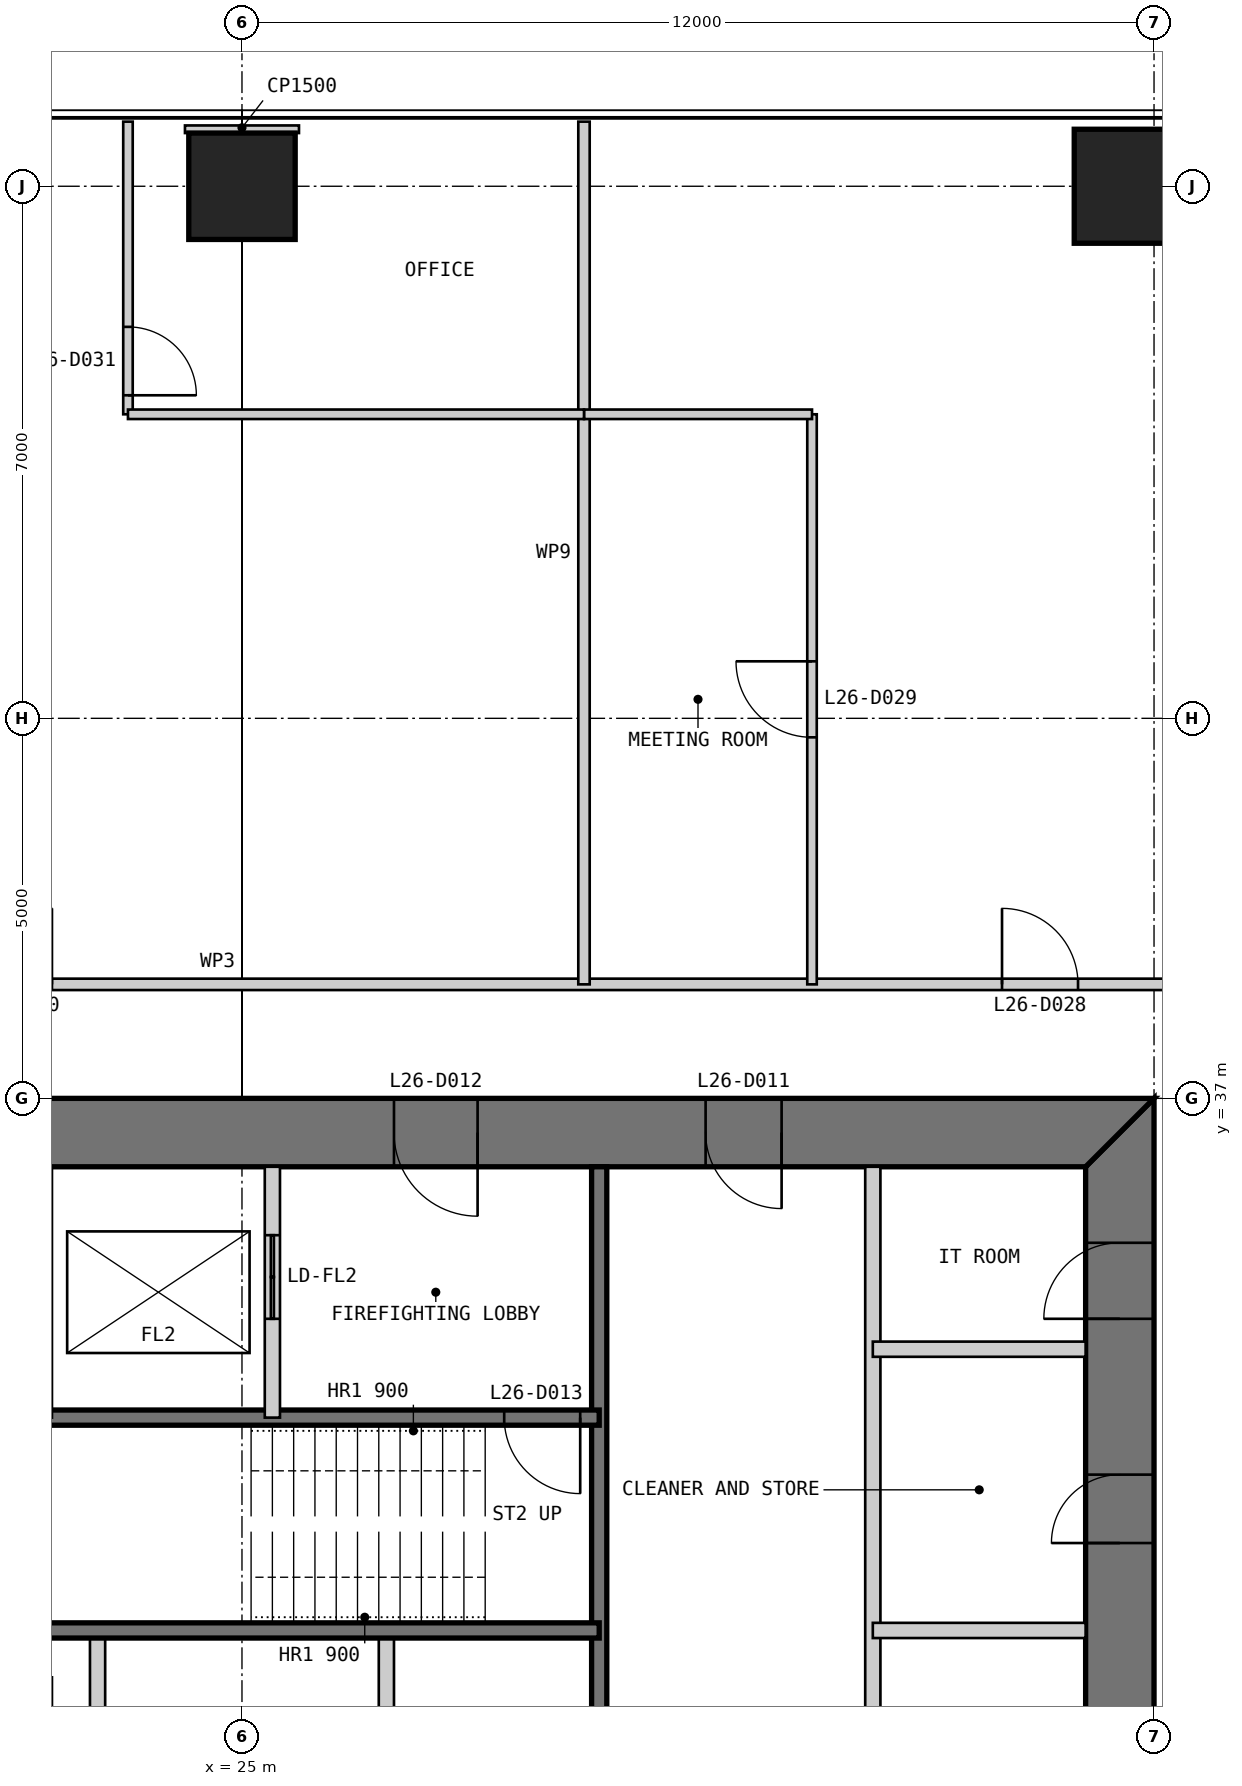
"""IFC4 building model, lengths in metres.
Left out: names, types, materials, properties, quantities, classifications, styles, units other than length and angle.
Written with IfcOpenShell. Run it as: python <this file> out.ifc"""

import sys

from ifc_helpers import new_model, si_unit, direction, frame, frame_2d, origin, origin_2d, place, context, subcontext, project, spatial, polyline, rectangle, outline, extrude, element, fill, save


model = new_model("IFC4")
c1 = context("Model", 3, precision=1e-05, world=origin(), true_north=direction((0.0, 1.0)))
c2 = subcontext(c1, "Body", "Model", "MODEL_VIEW")
j1 = project(units=[si_unit("LENGTHUNIT", "METRE"), si_unit("PLANEANGLEUNIT", "RADIAN")], contexts=[c1])
p1 = place(None, origin())
s1 = spatial("IfcSite", under=j1, at=p1, CompositionType="ELEMENT")
p2 = place(p1, origin())
s2 = spatial("IfcBuilding", under=s1, at=p2, CompositionType="ELEMENT")
p3 = place(p2, frame((0.0, 0.0, 114.4)))
s3 = spatial("IfcBuildingStorey", under=s2, at=p3, CompositionType="ELEMENT", Elevation=114.4)
p4 = place(p3, frame((37.0, 49.0, 0.0), z_axis=(0.0, 0.0, 1.0), x_axis=(1.0, 0.0, 0.0)))
e1 = element("IfcColumn", 1, at=p4, inside=s3, PredefinedType="COLUMN", context=c2, shape_type="SweptSolid", body=[
    extrude(rectangle(XDim=2.1, YDim=1.5, at=origin_2d()), origin(), (0.0, 0.0, 1.0), 4.0),
])
p5 = place(p3, frame((25.0, 49.0, 0.0), z_axis=(0.0, 0.0, 1.0), x_axis=(1.0, 0.0, 0.0)))
e2 = element("IfcColumn", 2, at=p5, inside=s3, PredefinedType="COLUMN", context=c2, shape_type="SweptSolid", body=[
    extrude(rectangle(XDim=1.4, YDim=1.4, at=origin_2d()), origin(), (0.0, 0.0, 1.0), 4.0),
])
p6 = place(p3, frame((36.55, 13.9, 0.0), z_axis=(0.0, 0.0, 1.0), x_axis=(0.0, 1.0, 0.0)))
e3 = element("IfcWall", 3, at=p6, inside=s3, PredefinedType="SHEAR", context=c2, shape_type="SweptSolid", body=[
    extrude(outline(polyline([(-0.9, -0.45), (23.1, -0.45), (22.2, 0.45), (0.0, 0.45), (-0.9, -0.45)])), origin(), (0.0, 0.0, 1.0), 4.0),
])
p7 = place(p6, frame((20.2, 0.0, 0.0)))
e4 = element("IfcOpeningElement", 4, at=p7, cuts=e3, PredefinedType="OPENING", context=c2, shape_type="SweptSolid", body=[
    extrude(rectangle(XDim=1.0, YDim=2.2, at=frame_2d((0.5, 1.1))), frame((0.0, 0.46, 0.0), z_axis=(0.0, -1.0, 0.0), x_axis=(1.0, 0.0, 0.0)), (0.0, 0.0, 1.0), 0.92),
])
p8 = place(p6, frame((17.25, 0.0, 0.0)))
e5 = element("IfcOpeningElement", 5, at=p8, cuts=e3, PredefinedType="OPENING", context=c2, shape_type="SweptSolid", body=[
    extrude(rectangle(XDim=0.9, YDim=2.2, at=frame_2d((0.45, 1.1))), frame((0.0, 0.46, 0.0), z_axis=(0.0, -1.0, 0.0), x_axis=(1.0, 0.0, 0.0)), (0.0, 0.0, 1.0), 0.92),
])
p9 = place(p3, frame((37.0, 36.55, 0.0), z_axis=(0.0, 0.0, 1.0), x_axis=(-1.0, 0.0, 0.0)))
e6 = element("IfcWall", 6, at=p9, inside=s3, PredefinedType="SHEAR", context=c2, shape_type="SweptSolid", body=[
    extrude(outline(polyline([(0.0, -0.45), (24.0, -0.45), (23.1, 0.45), (0.9, 0.45), (0.0, -0.45)])), origin(), (0.0, 0.0, 1.0), 4.0),
])
p10 = place(p9, frame((4.9, 0.0, 0.0)))
e7 = element("IfcOpeningElement", 7, at=p10, cuts=e6, PredefinedType="OPENING", context=c2, shape_type="SweptSolid", body=[
    extrude(rectangle(XDim=1.0, YDim=2.2, at=frame_2d((0.5, 1.1))), frame((0.0, 0.46, 0.0), z_axis=(0.0, -1.0, 0.0), x_axis=(1.0, 0.0, 0.0)), (0.0, 0.0, 1.0), 0.92),
])
p11 = place(p9, frame((8.9, 0.0, 0.0)))
e8 = element("IfcOpeningElement", 8, at=p11, cuts=e6, PredefinedType="OPENING", context=c2, shape_type="SweptSolid", body=[
    extrude(rectangle(XDim=1.1, YDim=2.2, at=frame_2d((0.55, 1.1))), frame((0.0, 0.46, 0.0), z_axis=(0.0, -1.0, 0.0), x_axis=(1.0, 0.0, 0.0)), (0.0, 0.0, 1.0), 0.92),
])
p12 = place(p9, frame((15.05, 0.0, 0.0)))
e9 = element("IfcOpeningElement", 9, at=p12, cuts=e6, PredefinedType="OPENING", context=c2, shape_type="SweptSolid", body=[
    extrude(rectangle(XDim=0.9, YDim=2.2, at=frame_2d((0.45, 1.1))), frame((0.0, 0.46, 0.0), z_axis=(0.0, -1.0, 0.0), x_axis=(1.0, 0.0, 0.0)), (0.0, 0.0, 1.0), 0.92),
])
p13 = place(p9, frame((17.9, 0.0, 0.0)))
e10 = element("IfcOpeningElement", 10, at=p13, cuts=e6, PredefinedType="OPENING", context=c2, shape_type="SweptSolid", body=[
    extrude(rectangle(XDim=1.0, YDim=2.2, at=frame_2d((0.5, 1.1))), frame((0.0, 0.46, 0.0), z_axis=(0.0, -1.0, 0.0), x_axis=(1.0, 0.0, 0.0)), (0.0, 0.0, 1.0), 0.92),
])
p14 = place(p9, frame((21.4, 0.0, 0.0)))
e11 = element("IfcOpeningElement", 11, at=p14, cuts=e6, PredefinedType="OPENING", context=c2, shape_type="SweptSolid", body=[
    extrude(rectangle(XDim=1.0, YDim=2.2, at=frame_2d((0.5, 1.1))), frame((0.0, 0.46, 0.0), z_axis=(0.0, -1.0, 0.0), x_axis=(1.0, 0.0, 0.0)), (0.0, 0.0, 1.0), 0.92),
])
p15 = place(p3, frame((23.1, 20.0, 0.0), z_axis=(0.0, 0.0, 1.0), x_axis=(0.0, 1.0, 0.0)))
e12 = element("IfcWall", 12, at=p15, inside=s3, PredefinedType="PARTITIONING", context=c2, shape_type="SweptSolid", body=[
    extrude(rectangle(XDim=10.0, YDim=0.2, at=frame_2d((5.0, 0.0))), origin(), (0.0, 0.0, 1.0), 3.8),
])
p16 = place(p3, frame((33.3, 36.1, 0.0), z_axis=(0.0, 0.0, 1.0), x_axis=(0.0, -1.0, 0.0)))
e13 = element("IfcWall", 13, at=p16, inside=s3, PredefinedType="PARTITIONING", context=c2, shape_type="SweptSolid", body=[
    extrude(rectangle(XDim=16.1, YDim=0.2, at=frame_2d((8.05, 0.0))), origin(), (0.0, 0.0, 1.0), 3.8),
])
p17 = place(p3, frame((29.7, 36.1, 0.0), z_axis=(0.0, 0.0, 1.0), x_axis=(0.0, -1.0, 0.0)))
e14 = element("IfcWall", 14, at=p17, inside=s3, PredefinedType="SOLIDWALL", context=c2, shape_type="SweptSolid", body=[
    extrude(rectangle(XDim=16.1, YDim=0.2, at=frame_2d((8.05, 0.0))), origin(), (0.0, 0.0, 1.0), 3.8),
])
p18 = place(p3, frame((36.1, 30.0, 0.0), z_axis=(0.0, 0.0, 1.0), x_axis=(-1.0, 0.0, 0.0)))
e15 = element("IfcWall", 15, at=p18, inside=s3, PredefinedType="PARTITIONING", context=c2, shape_type="SweptSolid", body=[
    extrude(rectangle(XDim=2.8, YDim=0.2, at=frame_2d((1.4, 0.0))), origin(), (0.0, 0.0, 1.0), 3.8),
])
p19 = place(p3, frame((26.9, 30.0, 0.0), z_axis=(0.0, 0.0, 1.0), x_axis=(0.0, -1.0, 0.0)))
e16 = element("IfcWall", 16, at=p19, inside=s3, PredefinedType="PARTITIONING", context=c2, shape_type="SweptSolid", body=[
    extrude(rectangle(XDim=10.0, YDim=0.2, at=frame_2d((5.0, 0.0))), origin(), (0.0, 0.0, 1.0), 3.8),
])
p20 = place(p3, frame((29.7, 32.8, 0.0), z_axis=(0.0, 0.0, 1.0), x_axis=(-1.0, 0.0, 0.0)))
e17 = element("IfcWall", 17, at=p20, inside=s3, PredefinedType="SOLIDWALL", context=c2, shape_type="SweptSolid", body=[
    extrude(rectangle(XDim=9.4, YDim=0.2, at=frame_2d((4.7, 0.0))), origin(), (0.0, 0.0, 1.0), 3.8),
])
p21 = place(p20, frame((0.25, 0.0, 0.0)))
e18 = element("IfcOpeningElement", 18, at=p21, cuts=e17, PredefinedType="OPENING", context=c2, shape_type="SweptSolid", body=[
    extrude(rectangle(XDim=1.0, YDim=2.2, at=frame_2d((0.5, 1.1))), frame((0.0, 0.11, 0.0), z_axis=(0.0, -1.0, 0.0), x_axis=(1.0, 0.0, 0.0)), (0.0, 0.0, 1.0), 0.22),
])
p22 = place(p3, frame((29.7, 30.0, 0.0), z_axis=(0.0, 0.0, 1.0), x_axis=(-1.0, 0.0, 0.0)))
e19 = element("IfcWall", 19, at=p22, inside=s3, PredefinedType="SOLIDWALL", context=c2, shape_type="SweptSolid", body=[
    extrude(rectangle(XDim=15.8, YDim=0.2, at=frame_2d((7.9, 0.0))), origin(), (0.0, 0.0, 1.0), 3.8),
])
p23 = place(p3, frame((25.4, 36.1, 0.0), z_axis=(0.0, 0.0, 1.0), x_axis=(0.0, -1.0, 0.0)))
e20 = element("IfcWall", 20, at=p23, inside=s3, PredefinedType="PARTITIONING", context=c2, shape_type="SweptSolid", body=[
    extrude(rectangle(XDim=3.3, YDim=0.2, at=frame_2d((1.65, 0.0))), origin(), (0.0, 0.0, 1.0), 3.8),
])
p24 = place(p23, frame((0.9, 0.0, 0.0)))
e21 = element("IfcOpeningElement", 21, at=p24, cuts=e20, PredefinedType="OPENING", context=c2, shape_type="SweptSolid", body=[
    extrude(rectangle(XDim=1.1, YDim=2.2, at=frame_2d((0.55, 1.1))), frame((0.0, 0.11, 0.0), z_axis=(0.0, -1.0, 0.0), x_axis=(1.0, 0.0, 0.0)), (0.0, 0.0, 1.0), 0.22),
])
p25 = place(p3, frame((36.1, 33.7, 0.0), z_axis=(0.0, 0.0, 1.0), x_axis=(-1.0, 0.0, 0.0)))
e22 = element("IfcWall", 22, at=p25, inside=s3, PredefinedType="PARTITIONING", context=c2, shape_type="SweptSolid", body=[
    extrude(rectangle(XDim=2.8, YDim=0.2, at=frame_2d((1.4, 0.0))), origin(), (0.0, 0.0, 1.0), 3.8),
])
p26 = place(p3, frame((38.5, 38.5, 0.0), z_axis=(0.0, 0.0, 1.0), x_axis=(-1.0, 0.0, 0.0)))
e23 = element("IfcWall", 23, at=p26, inside=s3, PredefinedType="PARTITIONING", context=c2, shape_type="SweptSolid", body=[
    extrude(rectangle(XDim=27.0, YDim=0.15, at=frame_2d((13.5, 0.0))), origin(), (0.0, 0.0, 1.0), 3.85),
])
p27 = place(p26, frame((2.5, 0.0, 0.0)))
e24 = element("IfcOpeningElement", 24, at=p27, cuts=e23, PredefinedType="OPENING", context=c2, shape_type="SweptSolid", body=[
    extrude(rectangle(XDim=1.0, YDim=2.2, at=frame_2d((0.5, 1.1))), frame((0.0, 0.085, 0.0), z_axis=(0.0, -1.0, 0.0), x_axis=(1.0, 0.0, 0.0)), (0.0, 0.0, 1.0), 0.17),
])
p28 = place(p26, frame((16.0, 0.0, 0.0)))
e25 = element("IfcOpeningElement", 25, at=p28, cuts=e23, PredefinedType="OPENING", context=c2, shape_type="SweptSolid", body=[
    extrude(rectangle(XDim=1.0, YDim=2.2, at=frame_2d((0.5, 1.1))), frame((0.0, 0.085, 0.0), z_axis=(0.0, -1.0, 0.0), x_axis=(1.0, 0.0, 0.0)), (0.0, 0.0, 1.0), 0.17),
])
p29 = place(p3, frame((32.5, 46.0, 0.0), z_axis=(0.0, 0.0, 1.0), x_axis=(0.0, -1.0, 0.0)))
e26 = element("IfcWall", 26, at=p29, inside=s3, PredefinedType="PARTITIONING", context=c2, shape_type="SweptSolid", body=[
    extrude(rectangle(XDim=7.5, YDim=0.125, at=frame_2d((3.75, 0.0))), origin(), (0.0, 0.0, 1.0), 3.85),
])
p30 = place(p29, frame((3.25, 0.0, 0.0)))
e27 = element("IfcOpeningElement", 27, at=p30, cuts=e26, PredefinedType="OPENING", context=c2, shape_type="SweptSolid", body=[
    extrude(rectangle(XDim=1.0, YDim=2.2, at=frame_2d((0.5, 1.1))), frame((0.0, 0.073, 0.0), z_axis=(0.0, -1.0, 0.0), x_axis=(1.0, 0.0, 0.0)), (0.0, 0.0, 1.0), 0.145),
])
p31 = place(p3, frame((29.5, 49.85, 0.0), z_axis=(0.0, 0.0, 1.0), x_axis=(0.0, -1.0, 0.0)))
e28 = element("IfcWall", 28, at=p31, inside=s3, PredefinedType="PARTITIONING", context=c2, shape_type="SweptSolid", body=[
    extrude(rectangle(XDim=11.35, YDim=0.15, at=frame_2d((5.675, 0.0))), origin(), (0.0, 0.0, 1.0), 3.85),
])
p32 = place(p3, frame((23.5, 49.85, 0.0), z_axis=(0.0, 0.0, 1.0), x_axis=(0.0, -1.0, 0.0)))
e29 = element("IfcWall", 29, at=p32, inside=s3, PredefinedType="PARTITIONING", context=c2, shape_type="SweptSolid", body=[
    extrude(rectangle(XDim=3.85, YDim=0.125, at=frame_2d((1.925, 0.0))), origin(), (0.0, 0.0, 1.0), 3.85),
])
p33 = place(p32, frame((2.7, 0.0, 0.0)))
e30 = element("IfcOpeningElement", 30, at=p33, cuts=e29, PredefinedType="OPENING", context=c2, shape_type="SweptSolid", body=[
    extrude(rectangle(XDim=0.9, YDim=2.2, at=frame_2d((0.45, 1.1))), frame((0.0, 0.073, 0.0), z_axis=(0.0, -1.0, 0.0), x_axis=(1.0, 0.0, 0.0)), (0.0, 0.0, 1.0), 0.145),
])
p34 = place(p3, frame((32.5, 46.0, 0.0), z_axis=(0.0, 0.0, 1.0), x_axis=(-1.0, 0.0, 0.0)))
e31 = element("IfcWall", 31, at=p34, inside=s3, PredefinedType="PARTITIONING", context=c2, shape_type="SweptSolid", body=[
    extrude(rectangle(XDim=3.0, YDim=0.125, at=frame_2d((1.5, 0.0))), origin(), (0.0, 0.0, 1.0), 3.85),
])
p35 = place(p3, frame((29.5, 46.0, 0.0), z_axis=(0.0, 0.0, 1.0), x_axis=(-1.0, 0.0, 0.0)))
e32 = element("IfcWall", 32, at=p35, inside=s3, PredefinedType="PARTITIONING", context=c2, shape_type="SweptSolid", body=[
    extrude(rectangle(XDim=6.0, YDim=0.125, at=frame_2d((3.0, 0.0))), origin(), (0.0, 0.0, 1.0), 3.85),
])
p36 = place(p3, frame((25.0, 49.8, 0.0), z_axis=(0.0, 0.0, 1.0), x_axis=(0.0, -1.0, 0.0)))
e33 = element("IfcWall", 33, at=p36, inside=s3, PredefinedType="PARTITIONING", context=c2, shape_type="SweptSolid", body=[
    extrude(rectangle(XDim=0.1, YDim=1.5, at=frame_2d((0.05, 0.0))), origin(), (0.0, 0.0, 1.0), 3.85),
])
p37 = place(p10, origin())
e34 = element("IfcDoor", 34, at=p37, inside=s3, OperationType="SINGLE_SWING_LEFT", PredefinedType="DOOR", context=c2, shape_type="SweptSolid", body=[
    extrude(rectangle(XDim=1.0, YDim=2.2, at=frame_2d((0.5, 1.1))), frame((0.0, 0.025, 0.0), z_axis=(0.0, -1.0, 0.0), x_axis=(1.0, 0.0, 0.0)), (0.0, 0.0, 1.0), 0.05),
    extrude(outline(polyline([(0.0, 0.0), (0.04, 0.0), (0.04, 2.16), (0.96, 2.16), (0.96, 0.0), (1.0, 0.0), (1.0, 2.2), (0.0, 2.2), (0.0, 0.0)])), frame((0.0, 0.3, 0.0), z_axis=(0.0, -1.0, 0.0), x_axis=(1.0, 0.0, 0.0)), (0.0, 0.0, 1.0), 0.6),
])
fill(e7, e34)
p38 = place(p11, origin())
e35 = element("IfcDoor", 35, at=p38, inside=s3, OperationType="SINGLE_SWING_LEFT", PredefinedType="DOOR", context=c2, shape_type="SweptSolid", body=[
    extrude(rectangle(XDim=1.1, YDim=2.2, at=frame_2d((0.55, 1.1))), frame((0.0, 0.025, 0.0), z_axis=(0.0, -1.0, 0.0), x_axis=(1.0, 0.0, 0.0)), (0.0, 0.0, 1.0), 0.05),
    extrude(outline(polyline([(0.0, 0.0), (0.04, 0.0), (0.04, 2.16), (1.06, 2.16), (1.06, 0.0), (1.1, 0.0), (1.1, 2.2), (0.0, 2.2), (0.0, 0.0)])), frame((0.0, 0.3, 0.0), z_axis=(0.0, -1.0, 0.0), x_axis=(1.0, 0.0, 0.0)), (0.0, 0.0, 1.0), 0.6),
])
fill(e8, e35)
p39 = place(p21, origin())
e36 = element("IfcDoor", 36, at=p39, inside=s3, OperationType="SINGLE_SWING_LEFT", PredefinedType="DOOR", context=c2, shape_type="SweptSolid", body=[
    extrude(rectangle(XDim=1.0, YDim=2.2, at=frame_2d((0.5, 1.1))), frame((0.0, 0.025, 0.0), z_axis=(0.0, -1.0, 0.0), x_axis=(1.0, 0.0, 0.0)), (0.0, 0.0, 1.0), 0.05),
])
fill(e18, e36)
p40 = place(p7, origin())
e37 = element("IfcDoor", 37, at=p40, inside=s3, OperationType="SINGLE_SWING_LEFT", PredefinedType="DOOR", context=c2, shape_type="SweptSolid", body=[
    extrude(rectangle(XDim=1.0, YDim=2.2, at=frame_2d((0.5, 1.1))), frame((0.0, 0.025, 0.0), z_axis=(0.0, -1.0, 0.0), x_axis=(1.0, 0.0, 0.0)), (0.0, 0.0, 1.0), 0.05),
    extrude(outline(polyline([(0.0, 0.0), (0.04, 0.0), (0.04, 2.16), (0.96, 2.16), (0.96, 0.0), (1.0, 0.0), (1.0, 2.2), (0.0, 2.2), (0.0, 0.0)])), frame((0.0, 0.3, 0.0), z_axis=(0.0, -1.0, 0.0), x_axis=(1.0, 0.0, 0.0)), (0.0, 0.0, 1.0), 0.6),
])
fill(e4, e37)
p41 = place(p8, origin())
e38 = element("IfcDoor", 38, at=p41, inside=s3, OperationType="SINGLE_SWING_LEFT", PredefinedType="DOOR", context=c2, shape_type="SweptSolid", body=[
    extrude(rectangle(XDim=0.9, YDim=2.2, at=frame_2d((0.45, 1.1))), frame((0.0, 0.025, 0.0), z_axis=(0.0, -1.0, 0.0), x_axis=(1.0, 0.0, 0.0)), (0.0, 0.0, 1.0), 0.05),
    extrude(outline(polyline([(0.0, 0.0), (0.04, 0.0), (0.04, 2.16), (0.86, 2.16), (0.86, 0.0), (0.9, 0.0), (0.9, 2.2), (0.0, 2.2), (0.0, 0.0)])), frame((0.0, 0.3, 0.0), z_axis=(0.0, -1.0, 0.0), x_axis=(1.0, 0.0, 0.0)), (0.0, 0.0, 1.0), 0.6),
])
fill(e5, e38)
p42 = place(p27, frame((1.0, 0.0, 0.0), z_axis=(0.0, 0.0, 1.0), x_axis=(-1.0, 0.0, 0.0)))
e39 = element("IfcDoor", 39, at=p42, inside=s3, OperationType="SINGLE_SWING_LEFT", PredefinedType="DOOR", context=c2, shape_type="SweptSolid", body=[
    extrude(rectangle(XDim=1.0, YDim=2.2, at=frame_2d((0.5, 1.1))), frame((0.0, 0.025, 0.0), z_axis=(0.0, -1.0, 0.0), x_axis=(1.0, 0.0, 0.0)), (0.0, 0.0, 1.0), 0.05),
])
fill(e24, e39)
p43 = place(p30, frame((1.0, 0.0, 0.0), z_axis=(0.0, 0.0, 1.0), x_axis=(-1.0, 0.0, 0.0)))
e40 = element("IfcDoor", 40, at=p43, inside=s3, OperationType="SINGLE_SWING_RIGHT", PredefinedType="DOOR", context=c2, shape_type="SweptSolid", body=[
    extrude(rectangle(XDim=1.0, YDim=2.2, at=frame_2d((0.5, 1.1))), frame((0.0, 0.025, 0.0), z_axis=(0.0, -1.0, 0.0), x_axis=(1.0, 0.0, 0.0)), (0.0, 0.0, 1.0), 0.05),
])
fill(e27, e40)
p44 = place(p33, origin())
e41 = element("IfcDoor", 41, at=p44, inside=s3, OperationType="SINGLE_SWING_RIGHT", PredefinedType="DOOR", context=c2, shape_type="SweptSolid", body=[
    extrude(rectangle(XDim=0.9, YDim=2.2, at=frame_2d((0.45, 1.1))), frame((0.0, 0.025, 0.0), z_axis=(0.0, -1.0, 0.0), x_axis=(1.0, 0.0, 0.0)), (0.0, 0.0, 1.0), 0.05),
])
fill(e30, e41)
p45 = place(p24, origin())
e42 = element("IfcDoor", 42, at=p45, inside=s3, OperationType="DOUBLE_DOOR_SLIDING", PredefinedType="DOOR", context=c2, shape_type="SweptSolid", body=[
    extrude(rectangle(XDim=1.1, YDim=2.2, at=frame_2d((0.55, 1.1))), frame((0.0, 0.025, 0.0), z_axis=(0.0, -1.0, 0.0), x_axis=(1.0, 0.0, 0.0)), (0.0, 0.0, 1.0), 0.05),
])
fill(e21, e42)
save(model, sys.argv[1])
